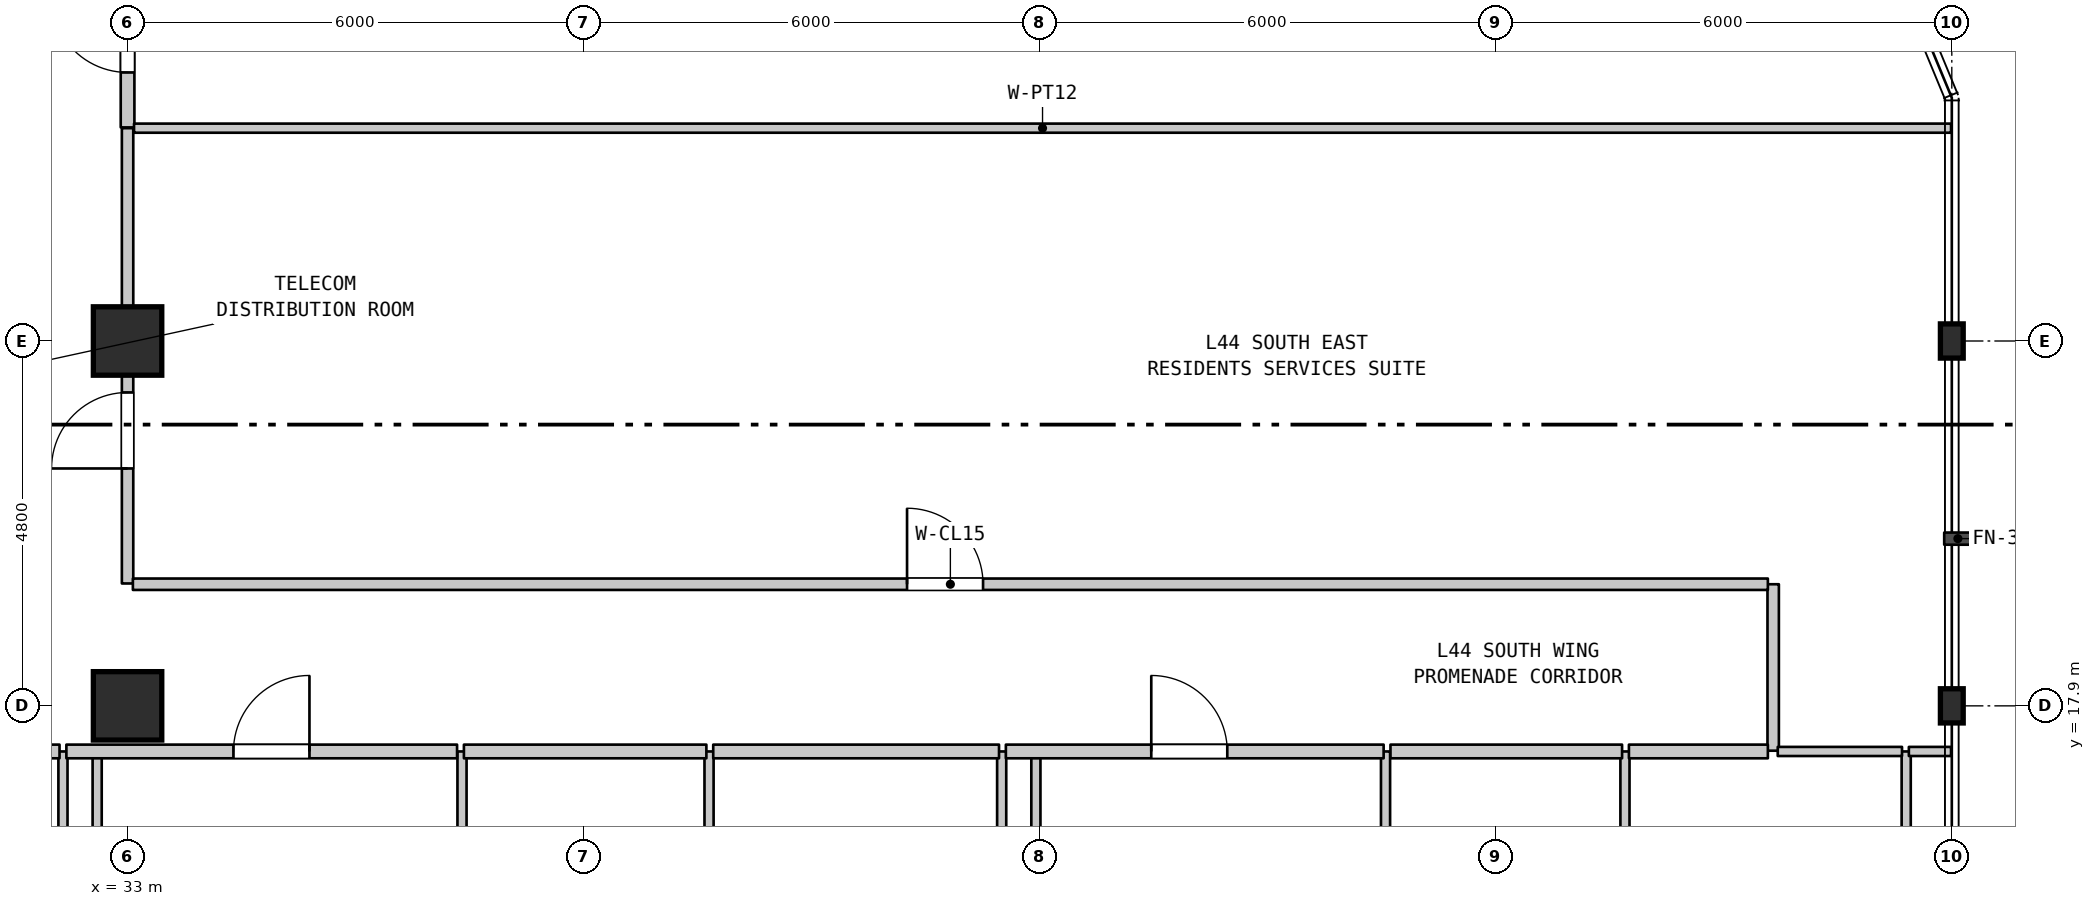
"""IFC4 building model, lengths in metres.
Left out: names, types, materials, properties, quantities, classifications, styles, units other than length and angle.
Written with IfcOpenShell. Run it as: python <this file> out.ifc"""

import sys

from ifc_helpers import new_model, si_unit, direction, frame, frame_2d, origin, origin_2d, place, context, subcontext, project, spatial, rectangle, i_section, extrude, element, fill, save


model = new_model("IFC4")
c1 = context("Model", 3, precision=1e-05, world=origin(), true_north=direction((0.0, 1.0)))
c2 = subcontext(c1, "Body", "Model", "MODEL_VIEW")
j1 = project(units=[si_unit("LENGTHUNIT", "METRE"), si_unit("PLANEANGLEUNIT", "RADIAN")], contexts=[c1])
p1 = place(None, origin())
s1 = spatial("IfcSite", under=j1, at=p1, CompositionType="ELEMENT")
p2 = place(p1, origin())
s2 = spatial("IfcBuilding", under=s1, at=p2, CompositionType="ELEMENT")
p3 = place(p2, frame((0.0, 0.0, 180.2)))
s3 = spatial("IfcBuildingStorey", under=s2, at=p3, CompositionType="ELEMENT", Elevation=180.2)
for number, where, z_axis, x_axis in (
    (1, (33.0, 17.9, 0.0), (0.0, 0.0, 1.0), (1.0, 0.0, 0.0)),
    (2, (33.0, 22.7, 0.0), (0.0, 0.0, 1.0), (1.0, 0.0, 0.0)),
):
    element("IfcColumn", number, at=place(p3, frame(where, z_axis=z_axis, x_axis=x_axis)), inside=s3, PredefinedType="COLUMN", context=c2, shape_type="SweptSolid", body=[
        extrude(rectangle(XDim=0.9, YDim=0.9, at=origin_2d()), origin(), (0.0, 0.0, 1.0), 3.7),
    ])
for number, where, z_axis, x_axis in (
    (3, (57.0, 17.9, 0.0), (0.0, 0.0, 1.0), (1.0, 0.0, 0.0)),
    (4, (57.0, 22.7, 0.0), (0.0, 0.0, 1.0), (1.0, 0.0, 0.0)),
):
    element("IfcColumn", number, at=place(p3, frame(where, z_axis=z_axis, x_axis=x_axis)), inside=s3, PredefinedType="COLUMN", context=c2, shape_type="SweptSolid", body=[
        extrude(i_section(OverallWidth=0.3, OverallDepth=0.45, WebThickness=0.014, FlangeThickness=0.026, FilletRadius=0.027, at=origin_2d()), origin(), (0.0, 0.0, 1.0), 3.7),
    ])
p4 = place(p3, frame((32.15, 11.15, 0.0), z_axis=(0.0, 0.0, 1.0), x_axis=(0.0, 1.0, 0.0)))
e5 = element("IfcWall", 5, at=p4, inside=s3, PredefinedType="PARTITIONING", context=c2, shape_type="SweptSolid", body=[
    extrude(rectangle(XDim=6.15, YDim=0.12, at=frame_2d((3.075, 0.0))), origin(), (0.0, 0.0, 1.0), 3.38),
])
p5 = place(p3, frame((32.6, 14.85, 0.0), z_axis=(0.0, 0.0, 1.0), x_axis=(0.0, 1.0, 0.0)))
e6 = element("IfcWall", 6, at=p5, inside=s3, PredefinedType="PARTITIONING", context=c2, shape_type="SweptSolid", body=[
    extrude(rectangle(XDim=2.45, YDim=0.12, at=frame_2d((1.225, 0.0))), origin(), (0.0, 0.0, 1.0), 3.38),
])
p6 = place(p3, frame((33.0, 19.51, 0.0), z_axis=(0.0, 0.0, 1.0), x_axis=(0.0, 1.0, 0.0)))
e7 = element("IfcWall", 7, at=p6, inside=s3, PredefinedType="STANDARD", context=c2, shape_type="SweptSolid", body=[
    extrude(rectangle(XDim=5.99, YDim=0.15, at=frame_2d((2.995, 0.0))), origin(), (0.0, 0.0, 1.0), 2.98),
])
p7 = place(p6, frame((1.513, 0.0, 0.0)))
e8 = element("IfcOpeningElement", 8, at=p7, cuts=e7, PredefinedType="OPENING", context=c2, shape_type="SweptSolid", body=[
    extrude(rectangle(XDim=1.0, YDim=2.15, at=frame_2d((0.5, 1.075))), frame((0.0, 0.085, 0.0), z_axis=(0.0, -1.0, 0.0), x_axis=(1.0, 0.0, 0.0)), (0.0, 0.0, 1.0), 0.17),
])
p8 = place(p3, frame((33.0, 25.51, 0.0), z_axis=(0.0, 0.0, 1.0), x_axis=(0.0, 1.0, 0.0)))
e9 = element("IfcWall", 9, at=p8, inside=s3, PredefinedType="STANDARD", context=c2, shape_type="SweptSolid", body=[
    extrude(rectangle(XDim=2.6, YDim=0.18, at=frame_2d((1.3, 0.0))), origin(), (0.0, 0.0, 1.0), 2.98),
])
p9 = place(p8, frame((0.723, 0.0, 0.0)))
e10 = element("IfcOpeningElement", 10, at=p9, cuts=e9, PredefinedType="OPENING", context=c2, shape_type="SweptSolid", body=[
    extrude(rectangle(XDim=1.0, YDim=2.15, at=frame_2d((0.5, 1.075))), frame((0.0, 0.1, 0.0), z_axis=(0.0, -1.0, 0.0), x_axis=(1.0, 0.0, 0.0)), (0.0, 0.0, 1.0), 0.2),
])
for number, where, z_axis, x_axis in (
    (11, (37.4, 11.15, 0.0), (0.0, 0.0, 1.0), (0.0, 1.0, 0.0)),
    (12, (40.65, 11.15, 0.0), (0.0, 0.0, 1.0), (0.0, 1.0, 0.0)),
    (13, (44.5, 11.15, 0.0), (0.0, 0.0, 1.0), (0.0, 1.0, 0.0)),
):
    element("IfcWall", number, at=place(p3, frame(where, z_axis=z_axis, x_axis=x_axis)), inside=s3, PredefinedType="PARTITIONING", context=c2, shape_type="SweptSolid", body=[
        extrude(rectangle(XDim=6.15, YDim=0.12, at=frame_2d((3.075, 0.0))), origin(), (0.0, 0.0, 1.0), 3.38),
    ])
p10 = place(p3, frame((44.95, 0.71, 0.0), z_axis=(0.0, 0.0, 1.0), x_axis=(0.0, 1.0, 0.0)))
e14 = element("IfcWall", 14, at=p10, inside=s3, PredefinedType="PARTITIONING", context=c2, shape_type="SweptSolid", body=[
    extrude(rectangle(XDim=16.59, YDim=0.12, at=frame_2d((8.295, 0.0))), origin(), (0.0, 0.0, 1.0), 3.38),
])
for number, where, z_axis, x_axis in (
    (15, (49.55, 11.15, 0.0), (0.0, 0.0, 1.0), (0.0, 1.0, 0.0)),
    (16, (52.7, 11.15, 0.0), (0.0, 0.0, 1.0), (0.0, 1.0, 0.0)),
):
    element("IfcWall", number, at=place(p3, frame(where, z_axis=z_axis, x_axis=x_axis)), inside=s3, PredefinedType="PARTITIONING", context=c2, shape_type="SweptSolid", body=[
        extrude(rectangle(XDim=6.15, YDim=0.12, at=frame_2d((3.075, 0.0))), origin(), (0.0, 0.0, 1.0), 3.38),
    ])
p11 = place(p3, frame((54.65, 17.31, 0.0), z_axis=(0.0, 0.0, 1.0), x_axis=(0.0, 1.0, 0.0)))
e17 = element("IfcWall", 17, at=p11, inside=s3, PredefinedType="STANDARD", context=c2, shape_type="SweptSolid", body=[
    extrude(rectangle(XDim=2.19, YDim=0.15, at=frame_2d((1.095, 0.0))), origin(), (0.0, 0.0, 1.0), 3.38),
])
p12 = place(p3, frame((56.4, 11.15, 0.0), z_axis=(0.0, 0.0, 1.0), x_axis=(0.0, 1.0, 0.0)))
e18 = element("IfcWall", 18, at=p12, inside=s3, PredefinedType="PARTITIONING", context=c2, shape_type="SweptSolid", body=[
    extrude(rectangle(XDim=6.15, YDim=0.12, at=frame_2d((3.075, 0.0))), origin(), (0.0, 0.0, 1.0), 3.38),
])
p13 = place(p3, frame((28.512, 17.3, 0.0), z_axis=(0.0, 0.0, 1.0), x_axis=(1.0, 0.0, 0.0)))
e19 = element("IfcWall", 19, at=p13, inside=s3, PredefinedType="STANDARD", context=c2, shape_type="SweptSolid", body=[
    extrude(rectangle(XDim=3.593, YDim=0.18, at=frame_2d((1.796, 0.0))), origin(), (0.0, 0.0, 1.0), 3.38),
])
p14 = place(p3, frame((32.195, 17.3, 0.0), z_axis=(0.0, 0.0, 1.0), x_axis=(1.0, 0.0, 0.0)))
e20 = element("IfcWall", 20, at=p14, inside=s3, PredefinedType="STANDARD", context=c2, shape_type="SweptSolid", body=[
    extrude(rectangle(XDim=5.14, YDim=0.18, at=frame_2d((2.57, 0.0))), origin(), (0.0, 0.0, 1.0), 3.38),
])
p15 = place(p14, frame((2.198, 0.0, 0.0)))
e21 = element("IfcOpeningElement", 21, at=p15, cuts=e20, PredefinedType="OPENING", context=c2, shape_type="SweptSolid", body=[
    extrude(rectangle(XDim=1.0, YDim=2.15, at=frame_2d((0.5, 1.075))), frame((0.0, 0.1, 0.0), z_axis=(0.0, -1.0, 0.0), x_axis=(1.0, 0.0, 0.0)), (0.0, 0.0, 1.0), 0.2),
])
p16 = place(p3, frame((37.425, 17.3, 0.0), z_axis=(0.0, 0.0, 1.0), x_axis=(1.0, 0.0, 0.0)))
e22 = element("IfcWall", 22, at=p16, inside=s3, PredefinedType="STANDARD", context=c2, shape_type="SweptSolid", body=[
    extrude(rectangle(XDim=3.19, YDim=0.18, at=frame_2d((1.595, 0.0))), origin(), (0.0, 0.0, 1.0), 3.38),
])
p17 = place(p3, frame((40.705, 17.3, 0.0), z_axis=(0.0, 0.0, 1.0), x_axis=(1.0, 0.0, 0.0)))
e23 = element("IfcWall", 23, at=p17, inside=s3, PredefinedType="STANDARD", context=c2, shape_type="SweptSolid", body=[
    extrude(rectangle(XDim=3.76, YDim=0.18, at=frame_2d((1.88, 0.0))), origin(), (0.0, 0.0, 1.0), 3.38),
])
p18 = place(p3, frame((44.555, 17.3, 0.0), z_axis=(0.0, 0.0, 1.0), x_axis=(1.0, 0.0, 0.0)))
e24 = element("IfcWall", 24, at=p18, inside=s3, PredefinedType="STANDARD", context=c2, shape_type="SweptSolid", body=[
    extrude(rectangle(XDim=4.97, YDim=0.18, at=frame_2d((2.485, 0.0))), origin(), (0.0, 0.0, 1.0), 3.38),
])
p19 = place(p18, frame((1.913, 0.0, 0.0)))
e25 = element("IfcOpeningElement", 25, at=p19, cuts=e24, PredefinedType="OPENING", context=c2, shape_type="SweptSolid", body=[
    extrude(rectangle(XDim=1.0, YDim=2.15, at=frame_2d((0.5, 1.075))), frame((0.0, 0.1, 0.0), z_axis=(0.0, -1.0, 0.0), x_axis=(1.0, 0.0, 0.0)), (0.0, 0.0, 1.0), 0.2),
])
p20 = place(p3, frame((49.615, 17.3, 0.0), z_axis=(0.0, 0.0, 1.0), x_axis=(1.0, 0.0, 0.0)))
e26 = element("IfcWall", 26, at=p20, inside=s3, PredefinedType="STANDARD", context=c2, shape_type="SweptSolid", body=[
    extrude(rectangle(XDim=3.047, YDim=0.18, at=frame_2d((1.523, 0.0))), origin(), (0.0, 0.0, 1.0), 3.38),
])
p21 = place(p3, frame((52.752, 17.3, 0.0), z_axis=(0.0, 0.0, 1.0), x_axis=(1.0, 0.0, 0.0)))
e27 = element("IfcWall", 27, at=p21, inside=s3, PredefinedType="STANDARD", context=c2, shape_type="SweptSolid", body=[
    extrude(rectangle(XDim=1.828, YDim=0.18, at=frame_2d((0.914, 0.0))), origin(), (0.0, 0.0, 1.0), 3.38),
])
p22 = place(p3, frame((54.71, 17.3, 0.0), z_axis=(0.0, 0.0, 1.0), x_axis=(1.0, 0.0, 0.0)))
e28 = element("IfcWall", 28, at=p22, inside=s3, PredefinedType="PARTITIONING", context=c2, shape_type="SweptSolid", body=[
    extrude(rectangle(XDim=1.635, YDim=0.12, at=frame_2d((0.817, 0.0))), origin(), (0.0, 0.0, 1.0), 3.38),
])
p23 = place(p3, frame((56.435, 17.3, 0.0), z_axis=(0.0, 0.0, 1.0), x_axis=(1.0, 0.0, 0.0)))
e29 = element("IfcWall", 29, at=p23, inside=s3, PredefinedType="PARTITIONING", context=c2, shape_type="SweptSolid", body=[
    extrude(rectangle(XDim=0.555, YDim=0.12, at=frame_2d((0.277, 0.0))), origin(), (0.0, 0.0, 1.0), 3.38),
])
p24 = place(p3, frame((33.07, 19.5, 0.0), z_axis=(0.0, 0.0, 1.0), x_axis=(1.0, 0.0, 0.0)))
e30 = element("IfcWall", 30, at=p24, inside=s3, PredefinedType="STANDARD", context=c2, shape_type="SweptSolid", body=[
    extrude(rectangle(XDim=21.51, YDim=0.15, at=frame_2d((10.755, 0.0))), origin(), (0.0, 0.0, 1.0), 3.38),
])
p25 = place(p24, frame((10.185, 0.0, 0.0)))
e31 = element("IfcOpeningElement", 31, at=p25, cuts=e30, PredefinedType="OPENING", context=c2, shape_type="SweptSolid", body=[
    extrude(rectangle(XDim=1.0, YDim=2.15, at=frame_2d((0.5, 1.075))), frame((0.0, 0.085, 0.0), z_axis=(0.0, -1.0, 0.0), x_axis=(1.0, 0.0, 0.0)), (0.0, 0.0, 1.0), 0.17),
])
p26 = place(p3, frame((33.085, 25.5, 0.0), z_axis=(0.0, 0.0, 1.0), x_axis=(1.0, 0.0, 0.0)))
e32 = element("IfcWall", 32, at=p26, inside=s3, PredefinedType="PARTITIONING", context=c2, shape_type="SweptSolid", body=[
    extrude(rectangle(XDim=23.905, YDim=0.12, at=frame_2d((11.953, 0.0))), origin(), (0.0, 0.0, 1.0), 3.38),
])
p27 = place(p7, origin())
e33 = element("IfcDoor", 33, at=p27, inside=s3, OperationType="SINGLE_SWING_LEFT", PredefinedType="DOOR", context=c2, shape_type="SweptSolid", body=[
    extrude(rectangle(XDim=1.0, YDim=2.15, at=frame_2d((0.5, 1.075))), frame((0.0, 0.025, 0.0), z_axis=(0.0, -1.0, 0.0), x_axis=(1.0, 0.0, 0.0)), (0.0, 0.0, 1.0), 0.05),
])
fill(e8, e33)
p28 = place(p9, origin())
e34 = element("IfcDoor", 34, at=p28, inside=s3, OperationType="SINGLE_SWING_RIGHT", PredefinedType="DOOR", context=c2, shape_type="SweptSolid", body=[
    extrude(rectangle(XDim=1.0, YDim=2.15, at=frame_2d((0.5, 1.075))), frame((0.0, 0.025, 0.0), z_axis=(0.0, -1.0, 0.0), x_axis=(1.0, 0.0, 0.0)), (0.0, 0.0, 1.0), 0.05),
])
fill(e10, e34)
p29 = place(p15, origin())
e35 = element("IfcDoor", 35, at=p29, inside=s3, OperationType="SINGLE_SWING_RIGHT", PredefinedType="DOOR", context=c2, shape_type="SweptSolid", body=[
    extrude(rectangle(XDim=1.0, YDim=2.15, at=frame_2d((0.5, 1.075))), frame((0.0, 0.025, 0.0), z_axis=(0.0, -1.0, 0.0), x_axis=(1.0, 0.0, 0.0)), (0.0, 0.0, 1.0), 0.05),
])
fill(e21, e35)
p30 = place(p19, origin())
e36 = element("IfcDoor", 36, at=p30, inside=s3, OperationType="SINGLE_SWING_LEFT", PredefinedType="DOOR", context=c2, shape_type="SweptSolid", body=[
    extrude(rectangle(XDim=1.0, YDim=2.15, at=frame_2d((0.5, 1.075))), frame((0.0, 0.025, 0.0), z_axis=(0.0, -1.0, 0.0), x_axis=(1.0, 0.0, 0.0)), (0.0, 0.0, 1.0), 0.05),
])
fill(e25, e36)
p31 = place(p25, origin())
e37 = element("IfcDoor", 37, at=p31, inside=s3, OperationType="SINGLE_SWING_LEFT", PredefinedType="DOOR", context=c2, shape_type="SweptSolid", body=[
    extrude(rectangle(XDim=1.0, YDim=2.15, at=frame_2d((0.5, 1.075))), frame((0.0, 0.025, 0.0), z_axis=(0.0, -1.0, 0.0), x_axis=(1.0, 0.0, 0.0)), (0.0, 0.0, 1.0), 0.05),
])
fill(e31, e37)
save(model, sys.argv[1])
